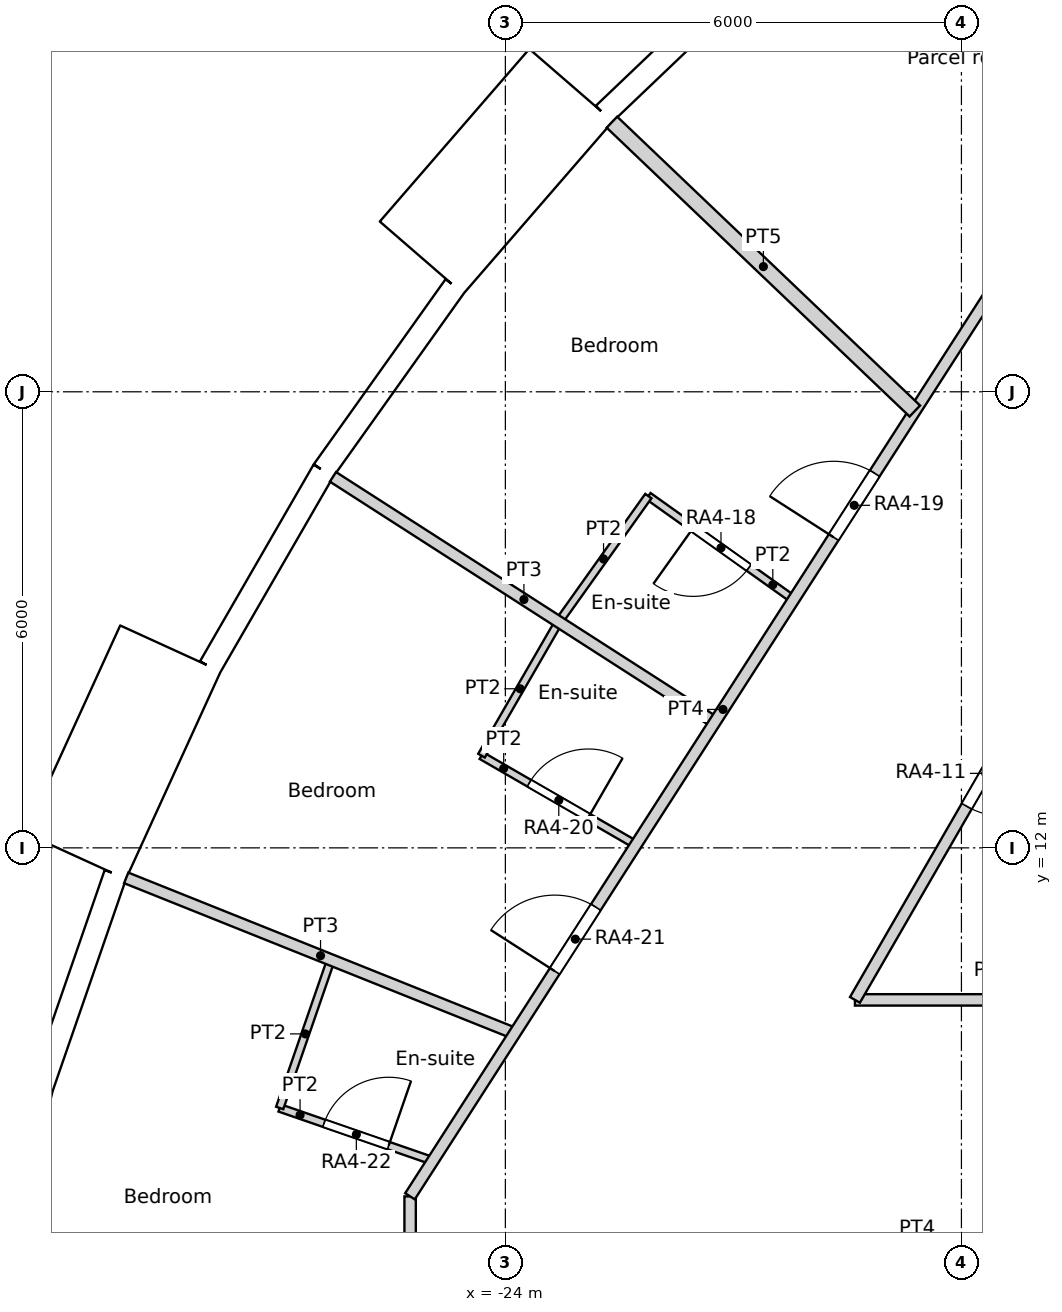
"""IFC4 building model, lengths in metres.
Left out: names, types, materials, properties, quantities, classifications, styles, units other than length and angle.
Written with IfcOpenShell. Run it as: python <this file> out.ifc"""

import sys

from ifc_helpers import new_model, si_unit, direction, frame, frame_2d, origin, origin_2d, place, context, subcontext, project, spatial, rectangle, circle, extrude, element, fill, save


model = new_model("IFC4")
c1 = context("Model", 3, precision=1e-05, world=origin(), true_north=direction((0.0, 1.0)))
c2 = subcontext(c1, "Body", "Model", "MODEL_VIEW")
j1 = project(units=[si_unit("LENGTHUNIT", "METRE"), si_unit("PLANEANGLEUNIT", "RADIAN")], contexts=[c1])
p1 = place(None, origin())
s1 = spatial("IfcSite", under=j1, at=p1, CompositionType="ELEMENT")
p2 = place(p1, origin())
s2 = spatial("IfcBuilding", under=s1, at=p2, CompositionType="ELEMENT")
p3 = place(p2, frame((0.0, 0.0, 60.6)))
s3 = spatial("IfcBuildingStorey", under=s2, at=p3, CompositionType="ELEMENT", Elevation=60.6)
for number, where, z_axis, x_axis in (
    (1, (-19.826, 22.88, 0.0), (0.0, 0.0, 1.0), (1.0, 0.0, 0.0)),
    (2, (-23.797, 18.715, 0.0), (0.0, 0.0, 1.0), (1.0, 0.0, 0.0)),
    (3, (-26.909, 13.873, 0.0), (0.0, 0.0, 1.0), (1.0, 0.0, 0.0)),
    (4, (-29.048, 8.529, 0.0), (0.0, 0.0, 1.0), (1.0, 0.0, 0.0)),
):
    element("IfcColumn", number, at=place(p3, frame(where, z_axis=z_axis, x_axis=x_axis)), inside=s3, PredefinedType="COLUMN", context=c2, shape_type="SweptSolid", body=[
        extrude(circle(Radius=0.7, at=origin_2d()), origin(), (0.0, 0.0, 1.0), 3.6),
    ])
for number, where, z_axis, x_axis in (
    (5, (-20.509, 13.489, 0.0), (0.0, 0.0, 1.0), (1.0, 0.0, 0.0)),
    (6, (-23.067, 8.396, 0.0), (0.0, 0.0, 1.0), (1.0, 0.0, 0.0)),
):
    element("IfcColumn", number, at=place(p3, frame(where, z_axis=z_axis, x_axis=x_axis)), inside=s3, PredefinedType="COLUMN", context=c2, shape_type="SweptSolid", body=[
        extrude(circle(Radius=0.75, at=origin_2d()), origin(), (0.0, 0.0, 1.0), 3.6),
    ])
p4 = place(p3, frame((-16.958, 8.167, 0.0), z_axis=(0.0, 0.0, 1.0), x_axis=(1.0, 0.0, 0.0)))
e7 = element("IfcColumn", 7, at=p4, inside=s3, PredefinedType="COLUMN", context=c2, shape_type="SweptSolid", body=[
    extrude(circle(Radius=0.8, at=origin_2d()), origin(), (0.0, 0.0, 1.0), 3.6),
])
p5 = place(p3, frame((-20.546, 23.711, 0.0), z_axis=(0.0, 0.0, 1.0), x_axis=(-0.723744206617, -0.690068346896, 0.0)))
e8 = element("IfcWall", 8, at=p5, inside=s3, PredefinedType="SOLIDWALL", context=c2, shape_type="SweptSolid", body=[
    extrude(rectangle(XDim=2.98, YDim=0.3, at=frame_2d((1.49, 0.0))), origin(), (0.0, 0.0, 1.0), 3.15),
])
p6 = place(p5, frame((1.49, 0.0, 1.55)))
e9 = element("IfcOpeningElement", 9, at=p6, cuts=e8, PredefinedType="OPENING", context=c2, shape_type="SweptSolid", body=[
    extrude(circle(Radius=0.9, at=origin_2d()), frame((0.0, 0.16, 0.0), z_axis=(0.0, -1.0, 0.0), x_axis=(1.0, 0.0, 0.0)), (0.0, 0.0, 1.0), 0.32),
])
p7 = place(p3, frame((-23.137, 22.033, -0.45), z_axis=(0.0, 0.0, 1.0), x_axis=(-0.654890259022, -0.75572398972, 0.0)))
e10 = element("IfcWall", 10, at=p7, inside=s3, PredefinedType="ELEMENTEDWALL", context=c2, shape_type="SweptSolid", body=[
    extrude(rectangle(XDim=3.0, YDim=1.45, at=frame_2d((1.5, 0.0))), origin(), (0.0, 0.0, 1.0), 3.6),
])
p8 = place(p7, frame((1.5, 0.0, 2.0)))
e11 = element("IfcOpeningElement", 11, at=p8, cuts=e10, PredefinedType="OPENING", context=c2, shape_type="SweptSolid", body=[
    extrude(circle(Radius=0.9, at=origin_2d()), frame((0.0, 0.735, 0.0), z_axis=(0.0, -1.0, 0.0), x_axis=(1.0, 0.0, 0.0)), (0.0, 0.0, 1.0), 1.47),
])
p9 = place(p3, frame((-24.666, 19.389, 0.0), z_axis=(0.0, 0.0, 1.0), x_axis=(-0.580059407678, -0.81457417315, 0.0)))
e12 = element("IfcWall", 12, at=p9, inside=s3, PredefinedType="SOLIDWALL", context=c2, shape_type="SweptSolid", body=[
    extrude(rectangle(XDim=2.979, YDim=0.3, at=frame_2d((1.49, 0.0))), origin(), (0.0, 0.0, 1.0), 2.65),
])
p10 = place(p9, frame((1.49, 0.0, 1.55)))
e13 = element("IfcOpeningElement", 13, at=p10, cuts=e12, PredefinedType="OPENING", context=c2, shape_type="SweptSolid", body=[
    extrude(circle(Radius=0.9, at=origin_2d()), frame((0.0, 0.16, 0.0), z_axis=(0.0, -1.0, 0.0), x_axis=(1.0, 0.0, 0.0)), (0.0, 0.0, 1.0), 0.32),
])
p11 = place(p3, frame((-26.394, 16.962, 0.0), z_axis=(0.0, 0.0, 1.0), x_axis=(-0.500025049464, -0.866010940986, 0.0)))
e14 = element("IfcWall", 14, at=p11, inside=s3, PredefinedType="SOLIDWALL", context=c2, shape_type="SweptSolid", body=[
    extrude(rectangle(XDim=2.98, YDim=0.3, at=frame_2d((1.49, 0.0))), origin(), (0.0, 0.0, 1.0), 3.15),
])
p12 = place(p11, frame((1.49, 0.0, 1.55)))
e15 = element("IfcOpeningElement", 15, at=p12, cuts=e14, PredefinedType="OPENING", context=c2, shape_type="SweptSolid", body=[
    extrude(circle(Radius=0.9, at=origin_2d()), frame((0.0, 0.16, 0.0), z_axis=(0.0, -1.0, 0.0), x_axis=(1.0, 0.0, 0.0)), (0.0, 0.0, 1.0), 0.32),
])
p13 = place(p3, frame((-28.407, 14.622, -0.45), z_axis=(0.0, 0.0, 1.0), x_axis=(-0.415427028395, -0.909626508012, 0.0)))
e16 = element("IfcWall", 16, at=p13, inside=s3, PredefinedType="ELEMENTEDWALL", context=c2, shape_type="SweptSolid", body=[
    extrude(rectangle(XDim=3.0, YDim=1.45, at=frame_2d((1.5, 0.0))), origin(), (0.0, 0.0, 1.0), 3.6),
])
p14 = place(p13, frame((1.5, 0.0, 2.0)))
e17 = element("IfcOpeningElement", 17, at=p14, cuts=e16, PredefinedType="OPENING", context=c2, shape_type="SweptSolid", body=[
    extrude(circle(Radius=0.9, at=origin_2d()), frame((0.0, 0.735, 0.0), z_axis=(0.0, -1.0, 0.0), x_axis=(1.0, 0.0, 0.0)), (0.0, 0.0, 1.0), 1.47),
])
p15 = place(p3, frame((-29.129, 11.655, 0.0), z_axis=(0.0, 0.0, 1.0), x_axis=(-0.327071167136, -0.944999709856, 0.0)))
e18 = element("IfcWall", 18, at=p15, inside=s3, PredefinedType="SOLIDWALL", context=c2, shape_type="SweptSolid", body=[
    extrude(rectangle(XDim=2.98, YDim=0.3, at=frame_2d((1.49, 0.0))), origin(), (0.0, 0.0, 1.0), 2.65),
])
p16 = place(p15, frame((1.49, 0.0, 1.55)))
e19 = element("IfcOpeningElement", 19, at=p16, cuts=e18, PredefinedType="OPENING", context=c2, shape_type="SweptSolid", body=[
    extrude(circle(Radius=0.9, at=origin_2d()), frame((0.0, 0.16, 0.0), z_axis=(0.0, -1.0, 0.0), x_axis=(1.0, 0.0, 0.0)), (0.0, 0.0, 1.0), 0.32),
])
p17 = place(p3, frame((-25.255, 7.416, 0.0), z_axis=(0.0, 0.0, 1.0), x_axis=(0.540805851332, 0.841147449123, 0.0)))
e20 = element("IfcWall", 20, at=p17, inside=s3, PredefinedType="PARTITIONING", context=c2, shape_type="SweptSolid", body=[
    extrude(rectangle(XDim=14.829, YDim=0.15, at=frame_2d((7.415, 0.0))), origin(), (0.0, 0.0, 1.0), 3.15),
])
p18 = place(p17, frame((10.307, 0.0, 0.0)))
e21 = element("IfcOpeningElement", 21, at=p18, cuts=e20, PredefinedType="OPENING", context=c2, shape_type="SweptSolid", body=[
    extrude(rectangle(XDim=1.0, YDim=2.1, at=frame_2d((0.5, 1.05))), frame((0.0, 0.075, 0.0), z_axis=(0.0, -1.0, 0.0), x_axis=(1.0, 0.0, 0.0)), (0.0, 0.0, 1.0), 0.15),
])
p19 = place(p17, frame((3.522, 0.0, 0.0)))
e22 = element("IfcOpeningElement", 22, at=p19, cuts=e20, PredefinedType="OPENING", context=c2, shape_type="SweptSolid", body=[
    extrude(rectangle(XDim=1.0, YDim=2.1, at=frame_2d((0.5, 1.05))), frame((0.0, 0.075, 0.0), z_axis=(0.0, -1.0, 0.0), x_axis=(1.0, 0.0, 0.0)), (0.0, 0.0, 1.0), 0.15),
])
p20 = place(p3, frame((-19.401, 10.0, 0.0), z_axis=(0.0, 0.0, 1.0), x_axis=(0.499992689227, 0.86602962462, 0.0)))
e23 = element("IfcWall", 23, at=p20, inside=s3, PredefinedType="PARTITIONING", context=c2, shape_type="SweptSolid", body=[
    extrude(rectangle(XDim=6.882, YDim=0.15, at=frame_2d((3.441, 0.0))), origin(), (0.0, 0.0, 1.0), 3.15),
])
p21 = place(p20, frame((2.941, 0.0, 0.0)))
e24 = element("IfcOpeningElement", 24, at=p21, cuts=e23, PredefinedType="OPENING", context=c2, shape_type="SweptSolid", body=[
    extrude(rectangle(XDim=1.0, YDim=2.04, at=frame_2d((0.5, 1.02))), frame((0.0, 0.075, 0.0), z_axis=(0.0, -1.0, 0.0), x_axis=(1.0, 0.0, 0.0)), (0.0, 0.0, 1.0), 0.15),
])
p22 = place(p3, frame((-19.401, 10.0, 0.0), z_axis=(0.0, 0.0, 1.0), x_axis=(1.0, 0.0, 0.0)))
e25 = element("IfcWall", 25, at=p22, inside=s3, PredefinedType="PARTITIONING", context=c2, shape_type="SweptSolid", body=[
    extrude(rectangle(XDim=3.601, YDim=0.15, at=frame_2d((1.8, 0.0))), origin(), (0.0, 0.0, 1.0), 3.15),
])
p23 = place(p3, frame((-25.253, -7.415, 0.0), z_axis=(0.0, 0.0, 1.0), x_axis=(0.0, 1.0, 0.0)))
e26 = element("IfcWall", 26, at=p23, inside=s3, PredefinedType="PARTITIONING", context=c2, shape_type="SweptSolid", body=[
    extrude(rectangle(XDim=14.83, YDim=0.15, at=frame_2d((7.415, 0.0))), origin(), (0.0, 0.0, 1.0), 3.15),
])
p24 = place(p23, frame((13.054, 0.0, 0.0)))
e27 = element("IfcOpeningElement", 27, at=p24, cuts=e26, PredefinedType="OPENING", context=c2, shape_type="SweptSolid", body=[
    extrude(rectangle(XDim=1.0, YDim=2.1, at=frame_2d((0.5, 1.05))), frame((0.0, 0.075, 0.0), z_axis=(0.0, -1.0, 0.0), x_axis=(1.0, 0.0, 0.0)), (0.0, 0.0, 1.0), 0.15),
])
p25 = place(p23, frame((8.169, 0.0, 0.0)))
e28 = element("IfcOpeningElement", 28, at=p25, cuts=e26, PredefinedType="OPENING", context=c2, shape_type="SweptSolid", body=[
    extrude(rectangle(XDim=1.0, YDim=2.1, at=frame_2d((0.5, 1.05))), frame((0.0, 0.075, 0.0), z_axis=(0.0, -1.0, 0.0), x_axis=(1.0, 0.0, 0.0)), (0.0, 0.0, 1.0), 0.15),
])
p26 = place(p23, frame((2.459, 0.0, 0.0)))
e29 = element("IfcOpeningElement", 29, at=p26, cuts=e26, PredefinedType="OPENING", context=c2, shape_type="SweptSolid", body=[
    extrude(rectangle(XDim=1.0, YDim=2.04, at=frame_2d((0.5, 1.02))), frame((0.0, 0.075, 0.0), z_axis=(0.0, -1.0, 0.0), x_axis=(1.0, 0.0, 0.0)), (0.0, 0.0, 1.0), 0.15),
])
p27 = place(p3, frame((-22.598, 21.547, 0.0), z_axis=(0.0, 0.0, 1.0), x_axis=(0.723689650329, -0.690125561044, 0.0)))
e30 = element("IfcWall", 30, at=p27, inside=s3, PredefinedType="PARTITIONING", context=c2, shape_type="SweptSolid", body=[
    extrude(rectangle(XDim=5.506, YDim=0.2, at=frame_2d((2.753, 0.0))), origin(), (0.0, 0.0, 1.0), 3.15),
])
p28 = place(p3, frame((-22.119, 16.628, 0.0), z_axis=(0.0, 0.0, 1.0), x_axis=(0.814498780807, -0.580165266165, 0.0)))
e31 = element("IfcWall", 31, at=p28, inside=s3, PredefinedType="PARTITIONING", context=c2, shape_type="SweptSolid", body=[
    extrude(rectangle(XDim=2.347, YDim=0.1, at=frame_2d((1.174, 0.0))), origin(), (0.0, 0.0, 1.0), 3.15),
])
p29 = place(p28, frame((0.723, 0.0, 0.0)))
e32 = element("IfcOpeningElement", 32, at=p29, cuts=e31, PredefinedType="OPENING", context=c2, shape_type="SweptSolid", body=[
    extrude(rectangle(XDim=0.9, YDim=2.04, at=frame_2d((0.45, 1.02))), frame((0.0, 0.05, 0.0), z_axis=(0.0, -1.0, 0.0), x_axis=(1.0, 0.0, 0.0)), (0.0, 0.0, 1.0), 0.1),
])
p30 = place(p3, frame((-23.298, 14.973, 0.0), z_axis=(0.0, 0.0, 1.0), x_axis=(0.580271800959, 0.81442288586, 0.0)))
e33 = element("IfcWall", 33, at=p30, inside=s3, PredefinedType="PARTITIONING", context=c2, shape_type="SweptSolid", body=[
    extrude(rectangle(XDim=2.032, YDim=0.1, at=frame_2d((1.016, 0.0))), origin(), (0.0, 0.0, 1.0), 3.15),
])
p31 = place(p3, frame((-26.268, 16.881, 0.0), z_axis=(0.0, 0.0, 1.0), x_axis=(0.841333855553, -0.540515812443, 0.0)))
e34 = element("IfcWall", 34, at=p31, inside=s3, PredefinedType="PARTITIONING", context=c2, shape_type="SweptSolid", body=[
    extrude(rectangle(XDim=5.972, YDim=0.15, at=frame_2d((2.986, 0.0))), origin(), (0.0, 0.0, 1.0), 3.15),
])
p32 = place(p3, frame((-24.314, 13.213, 0.0), z_axis=(0.0, 0.0, 1.0), x_axis=(0.499899251727, 0.866083563014, 0.0)))
e35 = element("IfcWall", 35, at=p32, inside=s3, PredefinedType="PARTITIONING", context=c2, shape_type="SweptSolid", body=[
    extrude(rectangle(XDim=2.032, YDim=0.1, at=frame_2d((1.016, 0.0))), origin(), (0.0, 0.0, 1.0), 3.15),
])
p33 = place(p3, frame((-24.314, 13.213, 0.0), z_axis=(0.0, 0.0, 1.0), x_axis=(0.866007195875, -0.500031535699, 0.0)))
e36 = element("IfcWall", 36, at=p33, inside=s3, PredefinedType="PARTITIONING", context=c2, shape_type="SweptSolid", body=[
    extrude(rectangle(XDim=2.347, YDim=0.1, at=frame_2d((1.174, 0.0))), origin(), (0.0, 0.0, 1.0), 3.15),
])
p34 = place(p33, frame((0.724, 0.0, 0.0)))
e37 = element("IfcOpeningElement", 37, at=p34, cuts=e36, PredefinedType="OPENING", context=c2, shape_type="SweptSolid", body=[
    extrude(rectangle(XDim=0.9, YDim=2.04, at=frame_2d((0.45, 1.02))), frame((0.0, 0.05, 0.0), z_axis=(0.0, -1.0, 0.0), x_axis=(1.0, 0.0, 0.0)), (0.0, 0.0, 1.0), 0.1),
])
p35 = place(p3, frame((-28.988, 11.605, 0.0), z_axis=(0.0, 0.0, 1.0), x_axis=(0.928335994683, -0.371742223828, 0.0)))
e38 = element("IfcWall", 38, at=p35, inside=s3, PredefinedType="PARTITIONING", context=c2, shape_type="SweptSolid", body=[
    extrude(rectangle(XDim=5.508, YDim=0.15, at=frame_2d((2.754, 0.0))), origin(), (0.0, 0.0, 1.0), 3.15),
])
p36 = place(p3, frame((-26.969, 8.578, 0.0), z_axis=(0.0, 0.0, 1.0), x_axis=(0.326825955114, 0.945084543871, 0.0)))
e39 = element("IfcWall", 39, at=p36, inside=s3, PredefinedType="PARTITIONING", context=c2, shape_type="SweptSolid", body=[
    extrude(rectangle(XDim=2.062, YDim=0.1, at=frame_2d((1.031, 0.0))), origin(), (0.0, 0.0, 1.0), 3.15),
])
p37 = place(p3, frame((-26.969, 8.578, 0.0), z_axis=(0.0, 0.0, 1.0), x_axis=(0.945146525342, -0.326646667877, 0.0)))
e40 = element("IfcWall", 40, at=p37, inside=s3, PredefinedType="PARTITIONING", context=c2, shape_type="SweptSolid", body=[
    extrude(rectangle(XDim=2.133, YDim=0.1, at=frame_2d((1.066, 0.0))), origin(), (0.0, 0.0, 1.0), 3.15),
])
p38 = place(p37, frame((0.617, 0.0, 0.0)))
e41 = element("IfcOpeningElement", 41, at=p38, cuts=e40, PredefinedType="OPENING", context=c2, shape_type="SweptSolid", body=[
    extrude(rectangle(XDim=0.9, YDim=2.04, at=frame_2d((0.45, 1.02))), frame((0.0, 0.05, 0.0), z_axis=(0.0, -1.0, 0.0), x_axis=(1.0, 0.0, 0.0)), (0.0, 0.0, 1.0), 0.1),
])
p39 = place(p6, origin())
e42 = element("IfcWindow", 42, at=p39, inside=s3, PartitioningType="SINGLE_PANEL", PredefinedType="WINDOW", context=c2, shape_type="SweptSolid", body=[
    extrude(circle(Radius=0.9, at=origin_2d()), frame((0.0, 0.12, 0.0), z_axis=(0.0, -1.0, 0.0), x_axis=(1.0, 0.0, 0.0)), (0.0, 0.0, 1.0), 0.1),
])
fill(e9, e42)
p40 = place(p8, origin())
e43 = element("IfcWindow", 43, at=p40, inside=s3, PartitioningType="SINGLE_PANEL", PredefinedType="WINDOW", context=c2, shape_type="SweptSolid", body=[
    extrude(circle(Radius=0.9, at=origin_2d()), frame((0.0, 0.695, 0.0), z_axis=(0.0, -1.0, 0.0), x_axis=(1.0, 0.0, 0.0)), (0.0, 0.0, 1.0), 0.1),
])
fill(e11, e43)
p41 = place(p10, origin())
e44 = element("IfcWindow", 44, at=p41, inside=s3, PartitioningType="SINGLE_PANEL", PredefinedType="WINDOW", context=c2, shape_type="SweptSolid", body=[
    extrude(circle(Radius=0.9, at=origin_2d()), frame((0.0, 0.12, 0.0), z_axis=(0.0, -1.0, 0.0), x_axis=(1.0, 0.0, 0.0)), (0.0, 0.0, 1.0), 0.1),
])
fill(e13, e44)
p42 = place(p12, origin())
e45 = element("IfcWindow", 45, at=p42, inside=s3, PartitioningType="SINGLE_PANEL", PredefinedType="WINDOW", context=c2, shape_type="SweptSolid", body=[
    extrude(circle(Radius=0.9, at=origin_2d()), frame((0.0, 0.12, 0.0), z_axis=(0.0, -1.0, 0.0), x_axis=(1.0, 0.0, 0.0)), (0.0, 0.0, 1.0), 0.1),
])
fill(e15, e45)
p43 = place(p14, origin())
e46 = element("IfcWindow", 46, at=p43, inside=s3, PartitioningType="SINGLE_PANEL", PredefinedType="WINDOW", context=c2, shape_type="SweptSolid", body=[
    extrude(circle(Radius=0.9, at=origin_2d()), frame((0.0, 0.695, 0.0), z_axis=(0.0, -1.0, 0.0), x_axis=(1.0, 0.0, 0.0)), (0.0, 0.0, 1.0), 0.1),
])
fill(e17, e46)
p44 = place(p16, origin())
e47 = element("IfcWindow", 47, at=p44, inside=s3, PartitioningType="SINGLE_PANEL", PredefinedType="WINDOW", context=c2, shape_type="SweptSolid", body=[
    extrude(circle(Radius=0.9, at=origin_2d()), frame((0.0, 0.12, 0.0), z_axis=(0.0, -1.0, 0.0), x_axis=(1.0, 0.0, 0.0)), (0.0, 0.0, 1.0), 0.1),
])
fill(e19, e47)
p45 = place(p21, origin())
e48 = element("IfcDoor", 48, at=p45, inside=s3, OperationType="SINGLE_SWING_LEFT", PredefinedType="DOOR", context=c2, shape_type="SweptSolid", body=[
    extrude(rectangle(XDim=1.0, YDim=2.04, at=frame_2d((0.5, 1.02))), frame((0.0, 0.025, 0.0), z_axis=(0.0, -1.0, 0.0), x_axis=(1.0, 0.0, 0.0)), (0.0, 0.0, 1.0), 0.05),
])
fill(e24, e48)
p46 = place(p29, origin())
e49 = element("IfcDoor", 49, at=p46, inside=s3, OperationType="SINGLE_SWING_RIGHT", PredefinedType="DOOR", context=c2, shape_type="SweptSolid", body=[
    extrude(rectangle(XDim=0.9, YDim=2.04, at=frame_2d((0.45, 1.02))), frame((0.0, 0.025, 0.0), z_axis=(0.0, -1.0, 0.0), x_axis=(1.0, 0.0, 0.0)), (0.0, 0.0, 1.0), 0.05),
])
fill(e32, e49)
p47 = place(p18, origin())
e50 = element("IfcDoor", 50, at=p47, inside=s3, OperationType="SINGLE_SWING_LEFT", PredefinedType="DOOR", context=c2, shape_type="SweptSolid", body=[
    extrude(rectangle(XDim=1.0, YDim=2.1, at=frame_2d((0.5, 1.05))), frame((0.0, 0.025, 0.0), z_axis=(0.0, -1.0, 0.0), x_axis=(1.0, 0.0, 0.0)), (0.0, 0.0, 1.0), 0.05),
])
fill(e21, e50)
p48 = place(p34, origin())
e51 = element("IfcDoor", 51, at=p48, inside=s3, OperationType="SINGLE_SWING_RIGHT", PredefinedType="DOOR", context=c2, shape_type="SweptSolid", body=[
    extrude(rectangle(XDim=0.9, YDim=2.04, at=frame_2d((0.45, 1.02))), frame((0.0, 0.025, 0.0), z_axis=(0.0, -1.0, 0.0), x_axis=(1.0, 0.0, 0.0)), (0.0, 0.0, 1.0), 0.05),
])
fill(e37, e51)
p49 = place(p19, origin())
e52 = element("IfcDoor", 52, at=p49, inside=s3, OperationType="SINGLE_SWING_LEFT", PredefinedType="DOOR", context=c2, shape_type="SweptSolid", body=[
    extrude(rectangle(XDim=1.0, YDim=2.1, at=frame_2d((0.5, 1.05))), frame((0.0, 0.025, 0.0), z_axis=(0.0, -1.0, 0.0), x_axis=(1.0, 0.0, 0.0)), (0.0, 0.0, 1.0), 0.05),
])
fill(e22, e52)
p50 = place(p38, origin())
e53 = element("IfcDoor", 53, at=p50, inside=s3, OperationType="SINGLE_SWING_RIGHT", PredefinedType="DOOR", context=c2, shape_type="SweptSolid", body=[
    extrude(rectangle(XDim=0.9, YDim=2.04, at=frame_2d((0.45, 1.02))), frame((0.0, 0.025, 0.0), z_axis=(0.0, -1.0, 0.0), x_axis=(1.0, 0.0, 0.0)), (0.0, 0.0, 1.0), 0.05),
])
fill(e41, e53)
save(model, sys.argv[1])
